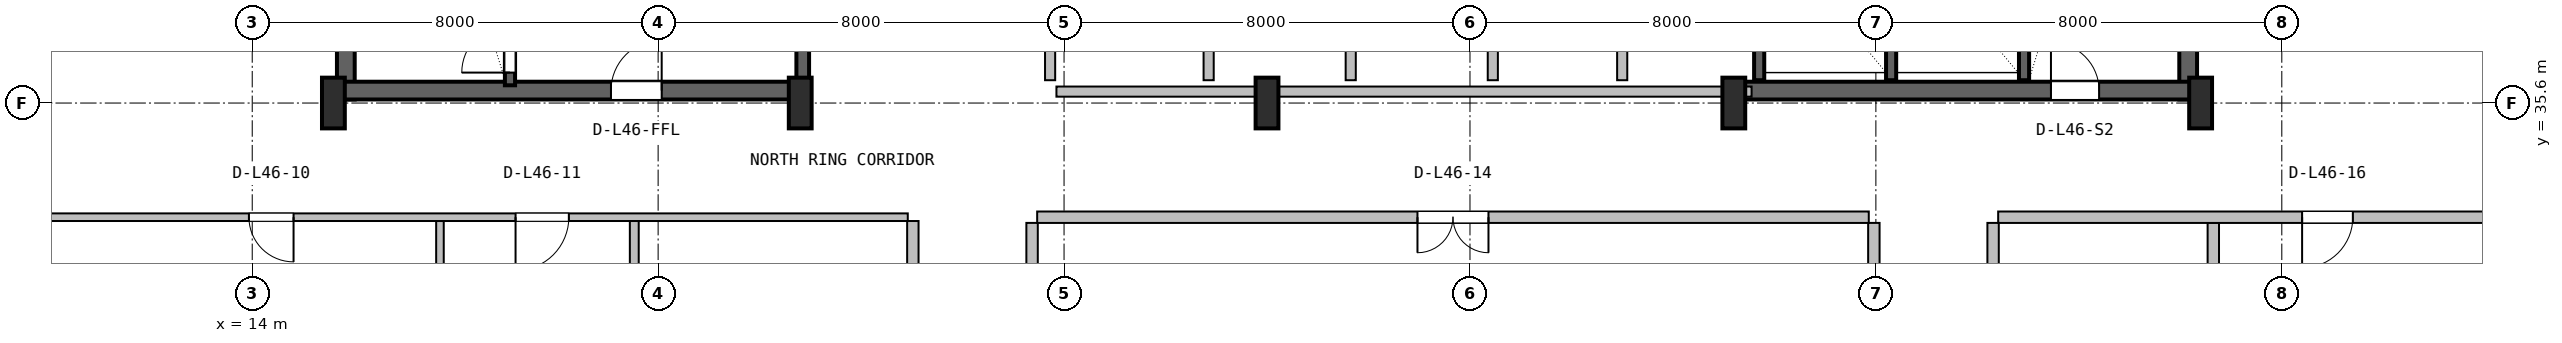
"""IFC4 building model, lengths in metres.
Left out: names, types, materials, properties, quantities, classifications, styles, units other than length and angle.
Written with IfcOpenShell. Run it as: python <this file> out.ifc"""

import sys

from ifc_helpers import new_model, si_unit, direction, frame, frame_2d, origin, origin_2d, place, context, subcontext, project, spatial, rectangle, i_section, extrude, source, transform, mapped, element, fill, save


model = new_model("IFC4")
c1 = context("Model", 3, precision=1e-05, world=origin(), true_north=direction((0.0, 1.0)))
c2 = subcontext(c1, "Body", "Model", "MODEL_VIEW")
j1 = project(units=[si_unit("LENGTHUNIT", "METRE"), si_unit("PLANEANGLEUNIT", "RADIAN")], contexts=[c1])
p1 = place(None, origin())
s1 = spatial("IfcSite", under=j1, at=p1, CompositionType="ELEMENT")
p2 = place(p1, origin())
s2 = spatial("IfcBuilding", under=s1, at=p2, CompositionType="ELEMENT")
p3 = place(p2, frame((0.0, 0.0, 187.6)))
s3 = spatial("IfcBuildingStorey", under=s2, at=p3, CompositionType="ELEMENT", Elevation=187.6)
for number, where, z_axis, x_axis in (
    (1, (15.845, 35.67, 0.0), (0.0, 0.0, 1.0), (0.0, 1.0, 0.0)),
    (2, (52.155, 35.67, 0.0), (0.0, 0.0, 1.0), (0.0, 1.0, 0.0)),
):
    element("IfcWall", number, at=place(p3, frame(where, z_axis=z_axis, x_axis=x_axis)), inside=s3, PredefinedType="SHEAR", context=c2, shape_type="SweptSolid", body=[
        extrude(rectangle(XDim=11.13, YDim=0.35, at=frame_2d((5.565, 0.0))), origin(), (0.0, 0.0, 1.0), 3.52),
    ])
p4 = place(p3, frame((15.67, 35.845, 0.0), z_axis=(0.0, 0.0, 1.0), x_axis=(1.0, 0.0, 0.0)))
e3 = element("IfcWall", 3, at=p4, inside=s3, PredefinedType="SHEAR", context=c2, shape_type="SweptSolid", body=[
    extrude(rectangle(XDim=9.13, YDim=0.35, at=frame_2d((4.565, 0.0))), origin(), (0.0, 0.0, 1.0), 3.52),
])
p5 = place(p4, frame((5.4, 0.0, 0.0)))
e4 = element("IfcOpeningElement", 4, at=p5, cuts=e3, PredefinedType="OPENING", context=c2, shape_type="SweptSolid", body=[
    extrude(rectangle(XDim=1.0, YDim=2.1, at=frame_2d((0.5, 1.05))), frame((0.0, 0.185, 0.0), z_axis=(0.0, -1.0, 0.0), x_axis=(1.0, 0.0, 0.0)), (0.0, 0.0, 1.0), 0.37),
])
p6 = place(p3, frame((43.2, 35.845, 0.0), z_axis=(0.0, 0.0, 1.0), x_axis=(1.0, 0.0, 0.0)))
e5 = element("IfcWall", 5, at=p6, inside=s3, PredefinedType="SHEAR", context=c2, shape_type="SweptSolid", body=[
    extrude(rectangle(XDim=9.13, YDim=0.35, at=frame_2d((4.565, 0.0))), origin(), (0.0, 0.0, 1.0), 3.52),
])
p7 = place(p6, frame((6.25, 0.0, 0.0)))
e6 = element("IfcOpeningElement", 6, at=p7, cuts=e5, PredefinedType="OPENING", context=c2, shape_type="SweptSolid", body=[
    extrude(rectangle(XDim=0.95, YDim=2.1, at=frame_2d((0.475, 1.05))), frame((0.0, 0.185, 0.0), z_axis=(0.0, -1.0, 0.0), x_axis=(1.0, 0.0, 0.0)), (0.0, 0.0, 1.0), 0.37),
])
m1 = source(origin(), c2, "Body", "SweptSolid", [
    extrude(i_section(OverallWidth=0.45, OverallDepth=1.0, WebThickness=0.016, FlangeThickness=0.03, FilletRadius=0.016, at=origin_2d()), origin(), (0.0, 0.0, 1.0), 3.8),
])
for number, where, z_axis, x_axis in (
    (7, (15.6, 35.6, 0.0), (0.0, 0.0, 1.0), (1.0, 0.0, 0.0)),
    (8, (24.8, 35.6, 0.0), (0.0, 0.0, 1.0), (1.0, 0.0, 0.0)),
    (9, (34.0, 35.6, 0.0), (0.0, 0.0, 1.0), (1.0, 0.0, 0.0)),
    (10, (43.2, 35.6, 0.0), (0.0, 0.0, 1.0), (1.0, 0.0, 0.0)),
    (11, (52.4, 35.6, 0.0), (0.0, 0.0, 1.0), (1.0, 0.0, 0.0)),
):
    element("IfcColumn", number, at=place(p3, frame(where, z_axis=z_axis, x_axis=x_axis)), inside=s3, PredefinedType="COLUMN", context=c2, shape_type="MappedRepresentation", body=[
        mapped(m1, transform((0.0, 0.0, 0.0), x_axis=(1.0, 0.0, 0.0), y_axis=(0.0, 1.0, 0.0), z_axis=(0.0, 0.0, 1.0), scale=1.0)),
    ])
p8 = place(p3, frame((19.08, 35.95, 0.0), z_axis=(0.0, 0.0, 1.0), x_axis=(0.0, 1.0, 0.0)))
e12 = element("IfcWall", 12, at=p8, inside=s3, PredefinedType="SHEAR", context=c2, shape_type="SweptSolid", body=[
    extrude(rectangle(XDim=9.65, YDim=0.2, at=frame_2d((4.825, 0.0))), origin(), (0.0, 0.0, 1.0), 3.52),
])
p9 = place(p8, frame((0.25, 0.0, 0.0)))
e13 = element("IfcOpeningElement", 13, at=p9, cuts=e12, PredefinedType="OPENING", context=c2, shape_type="SweptSolid", body=[
    extrude(rectangle(XDim=0.95, YDim=2.1, at=frame_2d((0.475, 1.05))), frame((0.0, 0.11, 0.0), z_axis=(0.0, -1.0, 0.0), x_axis=(1.0, 0.0, 0.0)), (0.0, 0.0, 1.0), 0.22),
])
p10 = place(p3, frame((24.85, 36.05, 0.0), z_axis=(0.0, 0.0, 1.0), x_axis=(0.0, 1.0, 0.0)))
e14 = element("IfcWall", 14, at=p10, inside=s3, PredefinedType="SHEAR", context=c2, shape_type="SweptSolid", body=[
    extrude(rectangle(XDim=10.45, YDim=0.25, at=frame_2d((5.225, 0.0))), origin(), (0.0, 0.0, 1.0), 3.52),
])
p11 = place(p3, frame((48.92, 36.05, 0.0), z_axis=(0.0, 0.0, 1.0), x_axis=(0.0, 1.0, 0.0)))
e15 = element("IfcWall", 15, at=p11, inside=s3, PredefinedType="SHEAR", context=c2, shape_type="SweptSolid", body=[
    extrude(rectangle(XDim=10.5, YDim=0.2, at=frame_2d((5.25, 0.0))), origin(), (0.0, 0.0, 1.0), 3.52),
])
for number, where, z_axis, x_axis in (
    (16, (43.7, 36.05, 0.0), (0.0, 0.0, 1.0), (0.0, 1.0, 0.0)),
    (17, (46.3, 36.05, 0.0), (0.0, 0.0, 1.0), (0.0, 1.0, 0.0)),
):
    element("IfcWall", number, at=place(p3, frame(where, z_axis=z_axis, x_axis=x_axis)), inside=s3, PredefinedType="SHEAR", context=c2, shape_type="SweptSolid", body=[
        extrude(rectangle(XDim=3.05, YDim=0.2, at=frame_2d((1.525, 0.0))), origin(), (0.0, 0.0, 1.0), 3.52),
    ])
p12 = place(p3, frame((29.85, 35.825, 0.0), z_axis=(0.0, 0.0, 1.0), x_axis=(1.0, 0.0, 0.0)))
e18 = element("IfcWall", 18, at=p12, inside=s3, PredefinedType="SOLIDWALL", context=c2, shape_type="SweptSolid", body=[
    extrude(rectangle(XDim=13.7, YDim=0.2, at=frame_2d((6.85, 0.0))), origin(), (0.0, 0.0, 1.0), 2.545),
])
for number, where, z_axis, x_axis in (
    (19, (32.85, 36.05, 0.0), (0.0, 0.0, 1.0), (0.0, 1.0, 0.0)),
    (20, (29.725, 36.05, 0.0), (0.0, 0.0, 1.0), (0.0, 1.0, 0.0)),
    (21, (35.65, 36.05, 0.0), (0.0, 0.0, 1.0), (0.0, 1.0, 0.0)),
    (22, (38.45, 36.05, 0.0), (0.0, 0.0, 1.0), (0.0, 1.0, 0.0)),
):
    element("IfcWall", number, at=place(p3, frame(where, z_axis=z_axis, x_axis=x_axis)), inside=s3, PredefinedType="PLUMBINGWALL", context=c2, shape_type="SweptSolid", body=[
        extrude(rectangle(XDim=3.1, YDim=0.2, at=frame_2d((1.55, 0.0))), origin(), (0.0, 0.0, 1.0), 3.5),
    ])
p13 = place(p3, frame((41.0, 36.05, 0.0), z_axis=(0.0, 0.0, 1.0), x_axis=(0.0, 1.0, 0.0)))
e23 = element("IfcWall", 23, at=p13, inside=s3, PredefinedType="SOLIDWALL", context=c2, shape_type="SweptSolid", body=[
    extrude(rectangle(XDim=3.1, YDim=0.2, at=frame_2d((1.55, 0.0))), origin(), (0.0, 0.0, 1.0), 3.5),
])
p14 = place(p3, frame((17.7, 22.043, 0.0), z_axis=(0.0, 0.0, 1.0), x_axis=(0.0, 1.0, 0.0)))
e24 = element("IfcWall", 24, at=p14, inside=s3, PredefinedType="PARTITIONING", context=c2, shape_type="SweptSolid", body=[
    extrude(rectangle(XDim=11.232, YDim=0.15, at=frame_2d((5.616, 0.0))), origin(), (0.0, 0.0, 1.0), 3.192),
])
p15 = place(p3, frame((7.18, 33.35, 0.0), z_axis=(0.0, 0.0, 1.0), x_axis=(1.0, 0.0, 0.0)))
e25 = element("IfcWall", 25, at=p15, inside=s3, PredefinedType="PARTITIONING", context=c2, shape_type="SweptSolid", body=[
    extrude(rectangle(XDim=19.74, YDim=0.15, at=frame_2d((9.87, 0.0))), origin(), (0.0, 0.0, 1.0), 2.879),
])
p16 = place(p15, frame((6.755, 0.0, 0.0)))
e26 = element("IfcOpeningElement", 26, at=p16, cuts=e25, PredefinedType="OPENING", context=c2, shape_type="SweptSolid", body=[
    extrude(rectangle(XDim=0.88, YDim=2.06, at=frame_2d((0.44, 1.03))), frame((0.0, 0.085, 0.0), z_axis=(0.0, -1.0, 0.0), x_axis=(1.0, 0.0, 0.0)), (0.0, 0.0, 1.0), 0.17),
])
p17 = place(p15, frame((12.01, 0.0, 0.0)))
e27 = element("IfcOpeningElement", 27, at=p17, cuts=e25, PredefinedType="OPENING", context=c2, shape_type="SweptSolid", body=[
    extrude(rectangle(XDim=1.05, YDim=2.1, at=frame_2d((0.525, 1.05))), frame((0.0, 0.085, 0.0), z_axis=(0.0, -1.0, 0.0), x_axis=(1.0, 0.0, 0.0)), (0.0, 0.0, 1.0), 0.17),
])
p18 = place(p3, frame((21.53, 22.043, 0.0), z_axis=(0.0, 0.0, 1.0), x_axis=(0.0, 1.0, 0.0)))
e28 = element("IfcWall", 28, at=p18, inside=s3, PredefinedType="PARTITIONING", context=c2, shape_type="SweptSolid", body=[
    extrude(rectangle(XDim=11.232, YDim=0.175, at=frame_2d((5.616, 0.0))), origin(), (0.0, 0.0, 1.0), 3.192),
])
p19 = place(p3, frame((27.02, 22.043, 0.0), z_axis=(0.0, 0.0, 1.0), x_axis=(0.0, 1.0, 0.0)))
e29 = element("IfcWall", 29, at=p19, inside=s3, PredefinedType="PARTITIONING", context=c2, shape_type="SweptSolid", body=[
    extrude(rectangle(XDim=11.232, YDim=0.225, at=frame_2d((5.616, 0.0))), origin(), (0.0, 0.0, 1.0), 2.879),
])
p20 = place(p19, frame((4.904, 0.0, 0.0)))
e30 = element("IfcOpeningElement", 30, at=p20, cuts=e29, PredefinedType="OPENING", context=c2, shape_type="SweptSolid", body=[
    extrude(rectangle(XDim=1.4, YDim=2.12, at=frame_2d((0.7, 1.06))), frame((0.0, 0.123, 0.0), z_axis=(0.0, -1.0, 0.0), x_axis=(1.0, 0.0, 0.0)), (0.0, 0.0, 1.0), 0.245),
])
for number, where, z_axis, x_axis in (
    (31, (45.96, 24.393, 0.0), (0.0, 0.0, 1.0), (0.0, 1.0, 0.0)),
    (32, (29.37, 24.393, 0.0), (0.0, 0.0, 1.0), (0.0, 1.0, 0.0)),
):
    element("IfcWall", number, at=place(p3, frame(where, z_axis=z_axis, x_axis=x_axis)), inside=s3, PredefinedType="PARTITIONING", context=c2, shape_type="SweptSolid", body=[
        extrude(rectangle(XDim=8.845, YDim=0.225, at=frame_2d((4.422, 0.0))), origin(), (0.0, 0.0, 1.0), 3.192),
    ])
p21 = place(p3, frame((29.47, 33.35, 0.0), z_axis=(0.0, 0.0, 1.0), x_axis=(1.0, 0.0, 0.0)))
e33 = element("IfcWall", 33, at=p21, inside=s3, PredefinedType="PARTITIONING", context=c2, shape_type="SweptSolid", body=[
    extrude(rectangle(XDim=16.39, YDim=0.225, at=frame_2d((8.195, 0.0))), origin(), (0.0, 0.0, 1.0), 2.879),
])
p22 = place(p21, frame((7.495, 0.0, 0.0)))
e34 = element("IfcOpeningElement", 34, at=p22, cuts=e33, PredefinedType="OPENING", context=c2, shape_type="SweptSolid", body=[
    extrude(rectangle(XDim=1.4, YDim=2.12, at=frame_2d((0.7, 1.06))), frame((0.0, 0.123, 0.0), z_axis=(0.0, -1.0, 0.0), x_axis=(1.0, 0.0, 0.0)), (0.0, 0.0, 1.0), 0.245),
])
p23 = place(p3, frame((52.65, 22.043, 0.0), z_axis=(0.0, 0.0, 1.0), x_axis=(0.0, 1.0, 0.0)))
e35 = element("IfcWall", 35, at=p23, inside=s3, PredefinedType="PARTITIONING", context=c2, shape_type="SweptSolid", body=[
    extrude(rectangle(XDim=11.195, YDim=0.225, at=frame_2d((5.598, 0.0))), origin(), (0.0, 0.0, 1.0), 3.192),
])
p24 = place(p3, frame((48.41, 33.35, 0.0), z_axis=(0.0, 0.0, 1.0), x_axis=(1.0, 0.0, 0.0)))
e36 = element("IfcWall", 36, at=p24, inside=s3, PredefinedType="PARTITIONING", context=c2, shape_type="SweptSolid", body=[
    extrude(rectangle(XDim=12.41, YDim=0.225, at=frame_2d((6.205, 0.0))), origin(), (0.0, 0.0, 1.0), 3.078),
])
p25 = place(p24, frame((5.99, 0.0, 0.0)))
e37 = element("IfcOpeningElement", 37, at=p25, cuts=e36, PredefinedType="OPENING", context=c2, shape_type="SweptSolid", body=[
    extrude(rectangle(XDim=1.0, YDim=2.1, at=frame_2d((0.5, 1.05))), frame((0.0, 0.123, 0.0), z_axis=(0.0, -1.0, 0.0), x_axis=(1.0, 0.0, 0.0)), (0.0, 0.0, 1.0), 0.245),
])
p26 = place(p3, frame((48.31, 22.043, 0.0), z_axis=(0.0, 0.0, 1.0), x_axis=(0.0, 1.0, 0.0)))
e38 = element("IfcWall", 38, at=p26, inside=s3, PredefinedType="PARTITIONING", context=c2, shape_type="SweptSolid", body=[
    extrude(rectangle(XDim=11.195, YDim=0.225, at=frame_2d((5.598, 0.0))), origin(), (0.0, 0.0, 1.0), 3.192),
])
p27 = place(p26, frame((5.138, 0.0, 0.0)))
e39 = element("IfcOpeningElement", 39, at=p27, cuts=e38, PredefinedType="OPENING", context=c2, shape_type="SweptSolid", body=[
    extrude(rectangle(XDim=0.92, YDim=2.08, at=frame_2d((0.46, 1.04))), frame((0.0, 0.123, 0.0), z_axis=(0.0, -1.0, 0.0), x_axis=(1.0, 0.0, 0.0)), (0.0, 0.0, 1.0), 0.245),
])
m2 = source(origin(), c2, "Body", "SweptSolid", [
    extrude(rectangle(XDim=0.95, YDim=2.1, at=frame_2d((0.475, 1.05))), frame((0.0, 0.025, 0.0), z_axis=(0.0, -1.0, 0.0), x_axis=(1.0, 0.0, 0.0)), (0.0, 0.0, 1.0), 0.05),
])
p28 = place(p9, origin())
e40 = element("IfcDoor", 40, at=p28, inside=s3, OperationType="SINGLE_SWING_LEFT", PredefinedType="DOOR", context=c2, shape_type="MappedRepresentation", body=[
    mapped(m2, transform((0.0, 0.0, 0.0), x_axis=(1.0, 0.0, 0.0), y_axis=(0.0, 1.0, 0.0), z_axis=(0.0, 0.0, 1.0), scale=1.0)),
])
fill(e13, e40)
m3 = source(origin(), c2, "Body", "SweptSolid", [
    extrude(rectangle(XDim=1.0, YDim=2.1, at=frame_2d((0.5, 1.05))), frame((0.0, 0.025, 0.0), z_axis=(0.0, -1.0, 0.0), x_axis=(1.0, 0.0, 0.0)), (0.0, 0.0, 1.0), 0.05),
])
p29 = place(p5, origin())
e41 = element("IfcDoor", 41, at=p29, inside=s3, OperationType="SINGLE_SWING_RIGHT", PredefinedType="DOOR", context=c2, shape_type="MappedRepresentation", body=[
    mapped(m3, transform((0.0, 0.0, 0.0), x_axis=(1.0, 0.0, 0.0), y_axis=(0.0, 1.0, 0.0), z_axis=(0.0, 0.0, 1.0), scale=1.0)),
])
fill(e4, e41)
p30 = place(p7, origin())
e42 = element("IfcDoor", 42, at=p30, inside=s3, OperationType="SINGLE_SWING_LEFT", PredefinedType="DOOR", context=c2, shape_type="MappedRepresentation", body=[
    mapped(m2, transform((0.0, 0.0, 0.0), x_axis=(1.0, 0.0, 0.0), y_axis=(0.0, 1.0, 0.0), z_axis=(0.0, 0.0, 1.0), scale=1.0)),
])
fill(e6, e42)
m4 = source(origin(), c2, "Body", "SweptSolid", [
    extrude(rectangle(XDim=0.88, YDim=2.06, at=frame_2d((0.44, 1.03))), frame((0.0, 0.025, 0.0), z_axis=(0.0, -1.0, 0.0), x_axis=(1.0, 0.0, 0.0)), (0.0, 0.0, 1.0), 0.05),
])
p31 = place(p16, frame((0.88, 0.0, 0.0), z_axis=(0.0, 0.0, 1.0), x_axis=(-1.0, 0.0, 0.0)))
e43 = element("IfcDoor", 43, at=p31, inside=s3, OperationType="SINGLE_SWING_RIGHT", PredefinedType="DOOR", context=c2, shape_type="MappedRepresentation", body=[
    mapped(m4, transform((0.0, 0.0, 0.0), x_axis=(1.0, 0.0, 0.0), y_axis=(0.0, 1.0, 0.0), z_axis=(0.0, 0.0, 1.0), scale=1.0)),
])
fill(e26, e43)
m5 = source(origin(), c2, "Body", "SweptSolid", [
    extrude(rectangle(XDim=1.05, YDim=2.1, at=frame_2d((0.525, 1.05))), frame((0.0, 0.025, 0.0), z_axis=(0.0, -1.0, 0.0), x_axis=(1.0, 0.0, 0.0)), (0.0, 0.0, 1.0), 0.05),
])
p32 = place(p17, frame((1.05, 0.0, 0.0), z_axis=(0.0, 0.0, 1.0), x_axis=(-1.0, 0.0, 0.0)))
e44 = element("IfcDoor", 44, at=p32, inside=s3, OperationType="SINGLE_SWING_LEFT", PredefinedType="DOOR", context=c2, shape_type="MappedRepresentation", body=[
    mapped(m5, transform((0.0, 0.0, 0.0), x_axis=(1.0, 0.0, 0.0), y_axis=(0.0, 1.0, 0.0), z_axis=(0.0, 0.0, 1.0), scale=1.0)),
])
fill(e27, e44)
m6 = source(origin(), c2, "Body", "SweptSolid", [
    extrude(rectangle(XDim=1.4, YDim=2.12, at=frame_2d((0.7, 1.06))), frame((0.0, 0.025, 0.0), z_axis=(0.0, -1.0, 0.0), x_axis=(1.0, 0.0, 0.0)), (0.0, 0.0, 1.0), 0.05),
])
p33 = place(p22, frame((1.4, 0.0, 0.0), z_axis=(0.0, 0.0, 1.0), x_axis=(-1.0, 0.0, 0.0)))
e45 = element("IfcDoor", 45, at=p33, inside=s3, OperationType="DOUBLE_DOOR_SINGLE_SWING", PredefinedType="DOOR", context=c2, shape_type="MappedRepresentation", body=[
    mapped(m6, transform((0.0, 0.0, 0.0), x_axis=(1.0, 0.0, 0.0), y_axis=(0.0, 1.0, 0.0), z_axis=(0.0, 0.0, 1.0), scale=1.0)),
])
fill(e34, e45)
m7 = source(origin(), c2, "Body", "SweptSolid", [
    extrude(rectangle(XDim=1.0, YDim=2.1, at=frame_2d((0.5, 1.05))), frame((0.0, 0.025, 0.0), z_axis=(0.0, -1.0, 0.0), x_axis=(1.0, 0.0, 0.0)), (0.0, 0.0, 1.0), 0.05),
])
p34 = place(p25, frame((1.0, 0.0, 0.0), z_axis=(0.0, 0.0, 1.0), x_axis=(-1.0, 0.0, 0.0)))
e46 = element("IfcDoor", 46, at=p34, inside=s3, OperationType="SINGLE_SWING_LEFT", PredefinedType="DOOR", context=c2, shape_type="MappedRepresentation", body=[
    mapped(m7, transform((0.0, 0.0, 0.0), x_axis=(1.0, 0.0, 0.0), y_axis=(0.0, 1.0, 0.0), z_axis=(0.0, 0.0, 1.0), scale=1.0)),
])
fill(e37, e46)
save(model, sys.argv[1])
